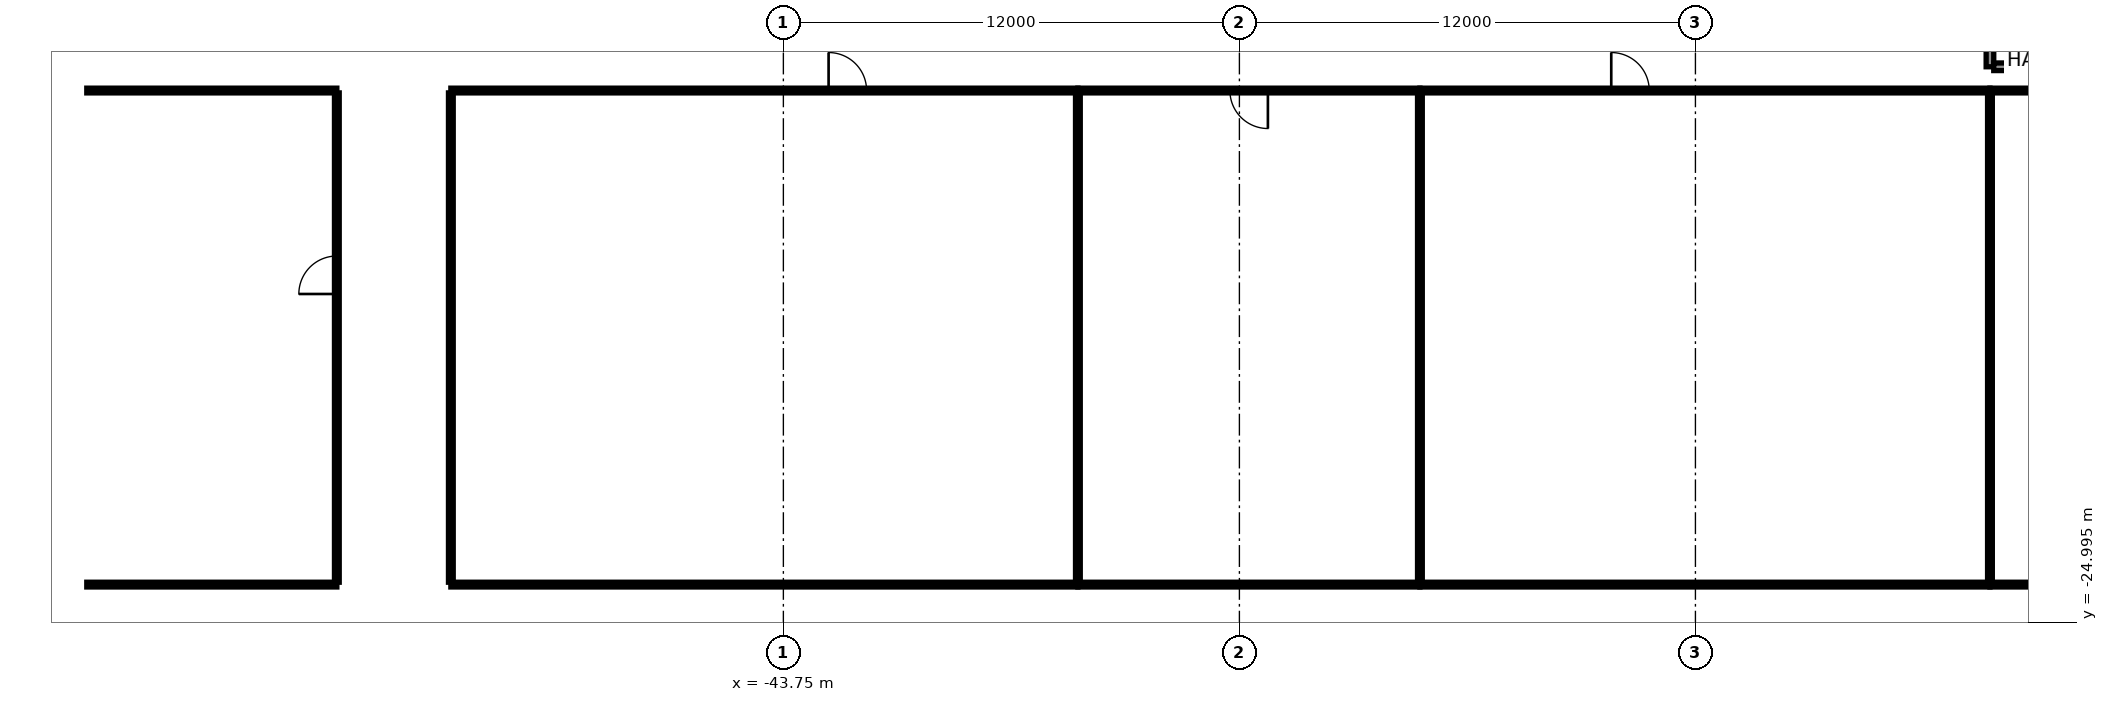
"""IFC4 building model, lengths in metres.
Left out: names, types, materials, properties, quantities, classifications, styles, units other than length and angle.
Written with IfcOpenShell. Run it as: python <this file> out.ifc"""

import sys

from ifc_helpers import new_model, si_unit, direction, frame, frame_2d, origin, origin_2d, place, context, subcontext, project, spatial, rectangle, hollow_rectangle, circle, extrude, element, fill, save


model = new_model("IFC4")
c1 = context("Model", 3, precision=1e-05, world=origin(), true_north=direction((0.0, 1.0)))
c2 = subcontext(c1, "Body", "Model", "MODEL_VIEW")
j1 = project(units=[si_unit("LENGTHUNIT", "METRE"), si_unit("PLANEANGLEUNIT", "RADIAN")], contexts=[c1])
p1 = place(None, origin())
s1 = spatial("IfcSite", under=j1, at=p1, CompositionType="ELEMENT")
p2 = place(p1, origin())
s2 = spatial("IfcBuilding", under=s1, at=p2, CompositionType="ELEMENT")
p3 = place(p2, frame((0.0, 0.0, 12.0)))
s3 = spatial("IfcBuildingStorey", under=s2, at=p3, CompositionType="ELEMENT", Elevation=12.0)
p4 = place(p3, frame((-59.4, -12.6, 0.0), z_axis=(0.0, 0.0, 1.0), x_axis=(1.0, 0.0, 0.0)))
e1 = element("IfcColumn", 1, at=p4, inside=s3, PredefinedType="COLUMN", context=c2, shape_type="SweptSolid", body=[
    extrude(circle(Radius=0.6, at=origin_2d()), origin(), (0.0, 0.0, 1.0), 4.2),
])
p5 = place(p3, frame((-54.6, -12.6, 0.0), z_axis=(0.0, 0.0, 1.0), x_axis=(1.0, 0.0, 0.0)))
e2 = element("IfcColumn", 2, at=p5, inside=s3, PredefinedType="COLUMN", context=c2, shape_type="SweptSolid", body=[
    extrude(circle(Radius=0.6, at=origin_2d()), origin(), (0.0, 0.0, 1.0), 4.5),
])
for number, where, z_axis, x_axis in (
    (3, (-42.961, -19.418, 0.0), (0.0, 0.0, 1.0), (-0.5, -0.866, 0.0)),
    (4, (-31.75, -21.904, 0.0), (0.0, 0.0, 1.0), (0.0, -1.0, 0.0)),
    (5, (-20.539, -19.418, 0.0), (0.0, 0.0, 1.0), (0.5, -0.866, 0.0)),
    (6, (-11.317, -11.797, 0.0), (0.0, 0.0, 1.0), (0.866, -0.5, 0.0)),
):
    element("IfcColumn", number, at=place(p3, frame(where, z_axis=z_axis, x_axis=x_axis)), inside=s3, PredefinedType="COLUMN", context=c2, shape_type="SweptSolid", body=[
        extrude(hollow_rectangle(XDim=1.5, YDim=1.5, WallThickness=0.07, at=origin_2d()), origin(), (0.0, 0.0, 1.0), 4.5),
    ])
p6 = place(p3, frame((-12.0, -6.525, 0.0), z_axis=(0.0, 0.0, 1.0), x_axis=(0.0, -1.0, 0.0)))
e7 = element("IfcWall", 7, at=p6, inside=s3, PredefinedType="SOLIDWALL", context=c2, shape_type="SweptSolid", body=[
    extrude(rectangle(XDim=3.85, YDim=0.2, at=frame_2d((1.925, 0.0))), origin(), (0.0, 0.0, 1.0), 4.2),
])
p7 = place(p6, frame((1.275, 0.0, 0.0)))
e8 = element("IfcOpeningElement", 8, at=p7, cuts=e7, PredefinedType="OPENING", context=c2, shape_type="SweptSolid", body=[
    extrude(rectangle(XDim=1.2, YDim=2.1, at=frame_2d((0.6, 1.05))), frame((0.0, 0.11, 0.0), z_axis=(0.0, -1.0, 0.0), x_axis=(1.0, 0.0, 0.0)), (0.0, 0.0, 1.0), 0.22),
])
p8 = place(p3, frame((-11.9, -10.375, 0.0), z_axis=(0.0, 0.0, 1.0), x_axis=(1.0, 0.0, 0.0)))
e9 = element("IfcWall", 9, at=p8, inside=s3, PredefinedType="SOLIDWALL", context=c2, shape_type="SweptSolid", body=[
    extrude(rectangle(XDim=7.0, YDim=0.2, at=frame_2d((3.5, 0.0))), origin(), (0.0, 0.0, 1.0), 4.2),
])
p9 = place(p3, frame((-62.08, -11.0, 0.0), z_axis=(0.0, 0.0, 1.0), x_axis=(1.0, 0.0, 0.0)))
e10 = element("IfcWall", 10, at=p9, inside=s3, PredefinedType="PARTITIONING", context=c2, shape_type="SweptSolid", body=[
    extrude(rectangle(XDim=6.58, YDim=0.125, at=frame_2d((3.29, 0.0))), origin(), (0.0, 0.0, 1.0), 2.68),
])
p10 = place(p3, frame((-52.5, -11.0, 0.0), z_axis=(0.0, 0.0, 1.0), x_axis=(1.0, 0.0, 0.0)))
e11 = element("IfcWall", 11, at=p10, inside=s3, PredefinedType="PARTITIONING", context=c2, shape_type="SweptSolid", body=[
    extrude(rectangle(XDim=16.5, YDim=0.125, at=frame_2d((8.25, 0.0))), origin(), (0.0, 0.0, 1.0), 3.496),
])
p11 = place(p10, frame((9.94, 0.0, 0.0)))
e12 = element("IfcOpeningElement", 12, at=p11, cuts=e11, PredefinedType="OPENING", context=c2, shape_type="SweptSolid", body=[
    extrude(rectangle(XDim=1.0, YDim=2.1, at=frame_2d((0.5, 1.05))), frame((0.0, 0.073, 0.0), z_axis=(0.0, -1.0, 0.0), x_axis=(1.0, 0.0, 0.0)), (0.0, 0.0, 1.0), 0.145),
])
p12 = place(p3, frame((-36.0, -11.0, 0.0), z_axis=(0.0, 0.0, 1.0), x_axis=(1.0, 0.0, 0.0)))
e13 = element("IfcWall", 13, at=p12, inside=s3, PredefinedType="PARTITIONING", context=c2, shape_type="SweptSolid", body=[
    extrude(rectangle(XDim=9.0, YDim=0.125, at=frame_2d((4.5, 0.0))), origin(), (0.0, 0.0, 1.0), 3.496),
])
p13 = place(p12, frame((4.0, 0.0, 0.0)))
e14 = element("IfcOpeningElement", 14, at=p13, cuts=e13, PredefinedType="OPENING", context=c2, shape_type="SweptSolid", body=[
    extrude(rectangle(XDim=1.0, YDim=2.1, at=frame_2d((0.5, 1.05))), frame((0.0, 0.073, 0.0), z_axis=(0.0, -1.0, 0.0), x_axis=(1.0, 0.0, 0.0)), (0.0, 0.0, 1.0), 0.145),
])
p14 = place(p3, frame((-27.0, -11.0, 0.0), z_axis=(0.0, 0.0, 1.0), x_axis=(1.0, 0.0, 0.0)))
e15 = element("IfcWall", 15, at=p14, inside=s3, PredefinedType="PARTITIONING", context=c2, shape_type="SweptSolid", body=[
    extrude(rectangle(XDim=15.0, YDim=0.125, at=frame_2d((7.5, 0.0))), origin(), (0.0, 0.0, 1.0), 3.496),
])
p15 = place(p14, frame((5.035, 0.0, 0.0)))
e16 = element("IfcOpeningElement", 16, at=p15, cuts=e15, PredefinedType="OPENING", context=c2, shape_type="SweptSolid", body=[
    extrude(rectangle(XDim=1.0, YDim=2.1, at=frame_2d((0.5, 1.05))), frame((0.0, 0.073, 0.0), z_axis=(0.0, -1.0, 0.0), x_axis=(1.0, 0.0, 0.0)), (0.0, 0.0, 1.0), 0.145),
])
p16 = place(p3, frame((-12.0, -11.0, 0.0), z_axis=(0.0, 0.0, 1.0), x_axis=(1.0, 0.0, 0.0)))
e17 = element("IfcWall", 17, at=p16, inside=s3, PredefinedType="PARTITIONING", context=c2, shape_type="SweptSolid", body=[
    extrude(rectangle(XDim=10.5, YDim=0.125, at=frame_2d((5.25, 0.0))), origin(), (0.0, 0.0, 1.0), 4.2),
])
p17 = place(p3, frame((-55.5, -24.0, 0.0), z_axis=(0.0, 0.0, 1.0), x_axis=(-1.0, 0.0, 0.0)))
e18 = element("IfcWall", 18, at=p17, inside=s3, PredefinedType="PARTITIONING", context=c2, shape_type="SweptSolid", body=[
    extrude(rectangle(XDim=6.58, YDim=0.125, at=frame_2d((3.29, 0.0))), origin(), (0.0, 0.0, 1.0), 2.68),
])
p18 = place(p3, frame((-36.0, -24.0, 0.0), z_axis=(0.0, 0.0, 1.0), x_axis=(-1.0, 0.0, 0.0)))
e19 = element("IfcWall", 19, at=p18, inside=s3, PredefinedType="PARTITIONING", context=c2, shape_type="SweptSolid", body=[
    extrude(rectangle(XDim=16.5, YDim=0.125, at=frame_2d((8.25, 0.0))), origin(), (0.0, 0.0, 1.0), 2.68),
])
p19 = place(p3, frame((-27.0, -24.0, 0.0), z_axis=(0.0, 0.0, 1.0), x_axis=(-1.0, 0.0, 0.0)))
e20 = element("IfcWall", 20, at=p19, inside=s3, PredefinedType="PARTITIONING", context=c2, shape_type="SweptSolid", body=[
    extrude(rectangle(XDim=9.0, YDim=0.125, at=frame_2d((4.5, 0.0))), origin(), (0.0, 0.0, 1.0), 2.68),
])
p20 = place(p3, frame((-12.0, -24.0, 0.0), z_axis=(0.0, 0.0, 1.0), x_axis=(-1.0, 0.0, 0.0)))
e21 = element("IfcWall", 21, at=p20, inside=s3, PredefinedType="PARTITIONING", context=c2, shape_type="SweptSolid", body=[
    extrude(rectangle(XDim=15.0, YDim=0.125, at=frame_2d((7.5, 0.0))), origin(), (0.0, 0.0, 1.0), 2.68),
])
p21 = place(p3, frame((-1.5, -24.0, 0.0), z_axis=(0.0, 0.0, 1.0), x_axis=(-1.0, 0.0, 0.0)))
e22 = element("IfcWall", 22, at=p21, inside=s3, PredefinedType="PARTITIONING", context=c2, shape_type="SweptSolid", body=[
    extrude(rectangle(XDim=10.5, YDim=0.125, at=frame_2d((5.25, 0.0))), origin(), (0.0, 0.0, 1.0), 2.68),
])
p22 = place(p3, frame((-55.5, -11.062, 0.0), z_axis=(0.0, 0.0, 1.0), x_axis=(0.0, -1.0, 0.0)))
e23 = element("IfcWall", 23, at=p22, inside=s3, PredefinedType="PARTITIONING", context=c2, shape_type="SweptSolid", body=[
    extrude(rectangle(XDim=12.875, YDim=0.125, at=frame_2d((6.438, 0.0))), origin(), (0.0, 0.0, 1.0), 2.68),
])
p23 = place(p22, frame((4.291, 0.0, 0.0)))
e24 = element("IfcOpeningElement", 24, at=p23, cuts=e23, PredefinedType="OPENING", context=c2, shape_type="SweptSolid", body=[
    extrude(rectangle(XDim=1.0, YDim=2.1, at=frame_2d((0.5, 1.05))), frame((0.0, 0.073, 0.0), z_axis=(0.0, -1.0, 0.0), x_axis=(1.0, 0.0, 0.0)), (0.0, 0.0, 1.0), 0.145),
])
p24 = place(p3, frame((-52.5, -23.938, 0.0), z_axis=(0.0, 0.0, 1.0), x_axis=(0.0, 1.0, 0.0)))
e25 = element("IfcWall", 25, at=p24, inside=s3, PredefinedType="PARTITIONING", context=c2, shape_type="SweptSolid", body=[
    extrude(rectangle(XDim=12.875, YDim=0.125, at=frame_2d((6.438, 0.0))), origin(), (0.0, 0.0, 1.0), 2.68),
])
for number, where, z_axis, x_axis in (
    (26, (-36.0, -23.938, 0.0), (0.0, 0.0, 1.0), (0.0, 1.0, 0.0)),
    (27, (-27.0, -23.938, 0.0), (0.0, 0.0, 1.0), (0.0, 1.0, 0.0)),
):
    element("IfcWall", number, at=place(p3, frame(where, z_axis=z_axis, x_axis=x_axis)), inside=s3, PredefinedType="PARTITIONING", context=c2, shape_type="SweptSolid", body=[
        extrude(rectangle(XDim=12.875, YDim=0.125, at=frame_2d((6.438, 0.0))), origin(), (0.0, 0.0, 1.0), 3.496),
    ])
p25 = place(p3, frame((-12.0, -23.938, 0.0), z_axis=(0.0, 0.0, 1.0), x_axis=(0.0, 1.0, 0.0)))
e28 = element("IfcWall", 28, at=p25, inside=s3, PredefinedType="PARTITIONING", context=c2, shape_type="SweptSolid", body=[
    extrude(rectangle(XDim=12.875, YDim=0.125, at=frame_2d((6.438, 0.0))), origin(), (0.0, 0.0, 1.0), 3.727),
])
p26 = place(p23, origin())
e29 = element("IfcDoor", 29, at=p26, inside=s3, OperationType="SINGLE_SWING_RIGHT", PredefinedType="DOOR", context=c2, shape_type="SweptSolid", body=[
    extrude(rectangle(XDim=1.0, YDim=2.1, at=frame_2d((0.5, 1.05))), frame((0.0, 0.025, 0.0), z_axis=(0.0, -1.0, 0.0), x_axis=(1.0, 0.0, 0.0)), (0.0, 0.0, 1.0), 0.05),
])
fill(e24, e29)
p27 = place(p11, origin())
e30 = element("IfcDoor", 30, at=p27, inside=s3, OperationType="SINGLE_SWING_LEFT", PredefinedType="DOOR", context=c2, shape_type="SweptSolid", body=[
    extrude(rectangle(XDim=1.0, YDim=2.1, at=frame_2d((0.5, 1.05))), frame((0.0, 0.025, 0.0), z_axis=(0.0, -1.0, 0.0), x_axis=(1.0, 0.0, 0.0)), (0.0, 0.0, 1.0), 0.05),
])
fill(e12, e30)
p28 = place(p13, origin())
e31 = element("IfcDoor", 31, at=p28, inside=s3, OperationType="SINGLE_SWING_RIGHT", PredefinedType="DOOR", context=c2, shape_type="SweptSolid", body=[
    extrude(rectangle(XDim=1.0, YDim=2.1, at=frame_2d((0.5, 1.05))), frame((0.0, 0.025, 0.0), z_axis=(0.0, -1.0, 0.0), x_axis=(1.0, 0.0, 0.0)), (0.0, 0.0, 1.0), 0.05),
])
fill(e14, e31)
p29 = place(p15, origin())
e32 = element("IfcDoor", 32, at=p29, inside=s3, OperationType="SINGLE_SWING_LEFT", PredefinedType="DOOR", context=c2, shape_type="SweptSolid", body=[
    extrude(rectangle(XDim=1.0, YDim=2.1, at=frame_2d((0.5, 1.05))), frame((0.0, 0.025, 0.0), z_axis=(0.0, -1.0, 0.0), x_axis=(1.0, 0.0, 0.0)), (0.0, 0.0, 1.0), 0.05),
])
fill(e16, e32)
save(model, sys.argv[1])
